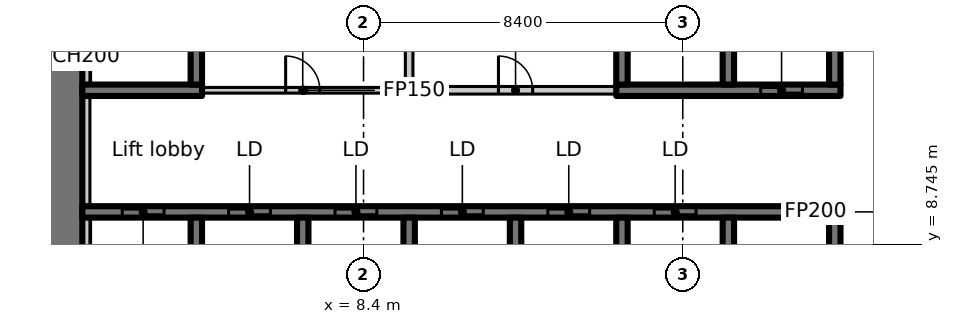
"""IFC4 building model, lengths in metres.
Left out: names, types, materials, properties, quantities, classifications, styles, units other than length and angle.
Written with IfcOpenShell. Run it as: python <this file> out.ifc"""

import sys

from ifc_helpers import new_model, si_unit, direction, frame, frame_2d, origin, place, context, subcontext, project, spatial, rectangle, extrude, element, fill, save


model = new_model("IFC4")
c1 = context("Model", 3, precision=1e-05, world=origin(), true_north=direction((0.0, 1.0)))
c2 = subcontext(c1, "Body", "Model", "MODEL_VIEW")
j1 = project(units=[si_unit("LENGTHUNIT", "METRE"), si_unit("PLANEANGLEUNIT", "RADIAN")], contexts=[c1])
p1 = place(None, origin())
s1 = spatial("IfcSite", under=j1, at=p1, CompositionType="ELEMENT")
p2 = place(p1, origin())
s2 = spatial("IfcBuilding", under=s1, at=p2, CompositionType="ELEMENT")
p3 = place(p2, frame((0.0, 0.0, 58.1)))
s3 = spatial("IfcBuildingStorey", under=s2, at=p3, CompositionType="ELEMENT", Elevation=58.1)
p4 = place(p3, frame((0.5, 6.936, 0.0), z_axis=(0.0, 0.0, 1.0), x_axis=(0.0, 1.0, 0.0)))
e1 = element("IfcWall", 1, at=p4, inside=s3, PredefinedType="SHEAR", context=c2, shape_type="SweptSolid", body=[
    extrude(rectangle(XDim=8.864, YDim=1.0, at=frame_2d((4.432, 0.0))), origin(), (0.0, 0.0, 1.0), 3.35),
])
p5 = place(p3, frame((1.0, 9.6, 0.0), z_axis=(0.0, 0.0, 1.0), x_axis=(1.0, 0.0, 0.0)))
e2 = element("IfcWall", 2, at=p5, inside=s3, PredefinedType="SHEAR", context=c2, shape_type="SweptSolid", body=[
    extrude(rectangle(XDim=19.95, YDim=0.3, at=frame_2d((9.975, 0.0))), origin(), (0.0, 0.0, 1.0), 3.35),
])
p6 = place(p5, frame((1.05, 0.0, 0.0)))
e3 = element("IfcOpeningElement", 3, at=p6, cuts=e2, PredefinedType="OPENING", context=c2, shape_type="SweptSolid", body=[
    extrude(rectangle(XDim=1.1, YDim=2.3, at=frame_2d((0.55, 1.15))), frame((0.0, 0.16, 0.0), z_axis=(0.0, -1.0, 0.0), x_axis=(1.0, 0.0, 0.0)), (0.0, 0.0, 1.0), 0.32),
])
p7 = place(p5, frame((3.85, 0.0, 0.0)))
e4 = element("IfcOpeningElement", 4, at=p7, cuts=e2, PredefinedType="OPENING", context=c2, shape_type="SweptSolid", body=[
    extrude(rectangle(XDim=1.1, YDim=2.3, at=frame_2d((0.55, 1.15))), frame((0.0, 0.16, 0.0), z_axis=(0.0, -1.0, 0.0), x_axis=(1.0, 0.0, 0.0)), (0.0, 0.0, 1.0), 0.32),
])
p8 = place(p5, frame((6.65, 0.0, 0.0)))
e5 = element("IfcOpeningElement", 5, at=p8, cuts=e2, PredefinedType="OPENING", context=c2, shape_type="SweptSolid", body=[
    extrude(rectangle(XDim=1.1, YDim=2.3, at=frame_2d((0.55, 1.15))), frame((0.0, 0.16, 0.0), z_axis=(0.0, -1.0, 0.0), x_axis=(1.0, 0.0, 0.0)), (0.0, 0.0, 1.0), 0.32),
])
p9 = place(p5, frame((9.45, 0.0, 0.0)))
e6 = element("IfcOpeningElement", 6, at=p9, cuts=e2, PredefinedType="OPENING", context=c2, shape_type="SweptSolid", body=[
    extrude(rectangle(XDim=1.1, YDim=2.3, at=frame_2d((0.55, 1.15))), frame((0.0, 0.16, 0.0), z_axis=(0.0, -1.0, 0.0), x_axis=(1.0, 0.0, 0.0)), (0.0, 0.0, 1.0), 0.32),
])
p10 = place(p5, frame((12.25, 0.0, 0.0)))
e7 = element("IfcOpeningElement", 7, at=p10, cuts=e2, PredefinedType="OPENING", context=c2, shape_type="SweptSolid", body=[
    extrude(rectangle(XDim=1.1, YDim=2.3, at=frame_2d((0.55, 1.15))), frame((0.0, 0.16, 0.0), z_axis=(0.0, -1.0, 0.0), x_axis=(1.0, 0.0, 0.0)), (0.0, 0.0, 1.0), 0.32),
])
p11 = place(p5, frame((15.05, 0.0, 0.0)))
e8 = element("IfcOpeningElement", 8, at=p11, cuts=e2, PredefinedType="OPENING", context=c2, shape_type="SweptSolid", body=[
    extrude(rectangle(XDim=1.1, YDim=2.3, at=frame_2d((0.55, 1.15))), frame((0.0, 0.16, 0.0), z_axis=(0.0, -1.0, 0.0), x_axis=(1.0, 0.0, 0.0)), (0.0, 0.0, 1.0), 0.32),
])
for number, where, z_axis, x_axis in (
    (9, (4.0, 7.15, 0.0), (0.0, 0.0, 1.0), (0.0, 1.0, 0.0)),
    (10, (6.8, 7.15, 0.0), (0.0, 0.0, 1.0), (0.0, 1.0, 0.0)),
    (11, (9.6, 7.15, 0.0), (0.0, 0.0, 1.0), (0.0, 1.0, 0.0)),
    (12, (12.4, 7.15, 0.0), (0.0, 0.0, 1.0), (0.0, 1.0, 0.0)),
    (13, (15.2, 7.15, 0.0), (0.0, 0.0, 1.0), (0.0, 1.0, 0.0)),
    (14, (18.0, 7.15, 0.0), (0.0, 0.0, 1.0), (0.0, 1.0, 0.0)),
    (15, (20.8, 7.15, 0.0), (0.0, 0.0, 1.0), (0.0, 1.0, 0.0)),
):
    element("IfcWall", number, at=place(p3, frame(where, z_axis=z_axis, x_axis=x_axis)), inside=s3, PredefinedType="SHEAR", context=c2, shape_type="SweptSolid", body=[
        extrude(rectangle(XDim=2.3, YDim=0.3, at=frame_2d((1.15, 0.0))), origin(), (0.0, 0.0, 1.0), 3.35),
    ])
p12 = place(p3, frame((1.0, 12.8, 0.0), z_axis=(0.0, 0.0, 1.0), x_axis=(1.0, 0.0, 0.0)))
e16 = element("IfcWall", 16, at=p12, inside=s3, PredefinedType="SHEAR", context=c2, shape_type="SweptSolid", body=[
    extrude(rectangle(XDim=3.15, YDim=0.3, at=frame_2d((1.575, 0.0))), origin(), (0.0, 0.0, 1.0), 3.35),
])
p13 = place(p3, frame((4.0, 12.95, 0.0), z_axis=(0.0, 0.0, 1.0), x_axis=(0.0, 1.0, 0.0)))
e17 = element("IfcWall", 17, at=p13, inside=s3, PredefinedType="SHEAR", context=c2, shape_type="SweptSolid", body=[
    extrude(rectangle(XDim=2.85, YDim=0.3, at=frame_2d((1.425, 0.0))), origin(), (0.0, 0.0, 1.0), 3.35),
])
p14 = place(p3, frame((15.05, 12.8, 0.0), z_axis=(0.0, 0.0, 1.0), x_axis=(1.0, 0.0, 0.0)))
e18 = element("IfcWall", 18, at=p14, inside=s3, PredefinedType="SHEAR", context=c2, shape_type="SweptSolid", body=[
    extrude(rectangle(XDim=5.9, YDim=0.3, at=frame_2d((2.95, 0.0))), origin(), (0.0, 0.0, 1.0), 3.35),
])
p15 = place(p14, frame((3.8, 0.0, 0.0)))
e19 = element("IfcOpeningElement", 19, at=p15, cuts=e18, PredefinedType="OPENING", context=c2, shape_type="SweptSolid", body=[
    extrude(rectangle(XDim=1.1, YDim=2.3, at=frame_2d((0.55, 1.15))), frame((0.0, 0.16, 0.0), z_axis=(0.0, -1.0, 0.0), x_axis=(1.0, 0.0, 0.0)), (0.0, 0.0, 1.0), 0.32),
])
for number, where, z_axis, x_axis in (
    (20, (15.2, 12.95, 0.0), (0.0, 0.0, 1.0), (0.0, 1.0, 0.0)),
    (21, (18.0, 12.95, 0.0), (0.0, 0.0, 1.0), (0.0, 1.0, 0.0)),
    (22, (20.8, 12.95, 0.0), (0.0, 0.0, 1.0), (0.0, 1.0, 0.0)),
):
    element("IfcWall", number, at=place(p3, frame(where, z_axis=z_axis, x_axis=x_axis)), inside=s3, PredefinedType="SHEAR", context=c2, shape_type="SweptSolid", body=[
        extrude(rectangle(XDim=2.85, YDim=0.3, at=frame_2d((1.425, 0.0))), origin(), (0.0, 0.0, 1.0), 3.35),
    ])
p16 = place(p3, frame((9.6, 15.588, 0.0), z_axis=(0.0, 0.0, 1.0), x_axis=(0.0, -1.0, 0.0)))
e23 = element("IfcWall", 23, at=p16, inside=s3, PredefinedType="PARTITIONING", context=c2, shape_type="SweptSolid", body=[
    extrude(rectangle(XDim=2.788, YDim=0.2, at=frame_2d((1.394, 0.0))), origin(), (0.0, 0.0, 1.0), 3.35),
])
p17 = place(p3, frame((9.7, 12.8, 0.0), z_axis=(0.0, 0.0, 1.0), x_axis=(1.0, 0.0, 0.0)))
e24 = element("IfcWall", 24, at=p17, inside=s3, PredefinedType="PARTITIONING", context=c2, shape_type="SweptSolid", body=[
    extrude(rectangle(XDim=5.338, YDim=0.2, at=frame_2d((2.669, 0.0))), origin(), (0.0, 0.0, 1.0), 3.35),
])
p18 = place(p17, frame((2.25, 0.0, 0.0)))
e25 = element("IfcOpeningElement", 25, at=p18, cuts=e24, PredefinedType="OPENING", context=c2, shape_type="SweptSolid", body=[
    extrude(rectangle(XDim=0.9, YDim=2.1, at=frame_2d((0.45, 1.05))), frame((0.0, 0.11, 0.0), z_axis=(0.0, -1.0, 0.0), x_axis=(1.0, 0.0, 0.0)), (0.0, 0.0, 1.0), 0.22),
])
p19 = place(p3, frame((4.162, 12.8, 0.0), z_axis=(0.0, 0.0, 1.0), x_axis=(1.0, 0.0, 0.0)))
e26 = element("IfcWall", 26, at=p19, inside=s3, PredefinedType="PARTITIONING", context=c2, shape_type="SweptSolid", body=[
    extrude(rectangle(XDim=5.338, YDim=0.15, at=frame_2d((2.669, 0.0))), origin(), (0.0, 0.0, 1.0), 3.35),
])
p20 = place(p19, frame((2.188, 0.0, 0.0)))
e27 = element("IfcOpeningElement", 27, at=p20, cuts=e26, PredefinedType="OPENING", context=c2, shape_type="SweptSolid", body=[
    extrude(rectangle(XDim=0.9, YDim=2.1, at=frame_2d((0.45, 1.05))), frame((0.0, 0.085, 0.0), z_axis=(0.0, -1.0, 0.0), x_axis=(1.0, 0.0, 0.0)), (0.0, 0.0, 1.0), 0.17),
])
p21 = place(p3, frame((1.1, 7.15, 0.0), z_axis=(0.0, 0.0, 1.0), x_axis=(0.0, 1.0, 0.0)))
e28 = element("IfcWall", 28, at=p21, inside=s3, PredefinedType="PARTITIONING", context=c2, shape_type="SweptSolid", body=[
    extrude(rectangle(XDim=2.3, YDim=0.2, at=frame_2d((1.15, 0.0))), origin(), (0.0, 0.0, 1.0), 3.35),
])
p22 = place(p3, frame((1.1, 9.75, 0.0), z_axis=(0.0, 0.0, 1.0), x_axis=(0.0, 1.0, 0.0)))
e29 = element("IfcWall", 29, at=p22, inside=s3, PredefinedType="PARTITIONING", context=c2, shape_type="SweptSolid", body=[
    extrude(rectangle(XDim=2.9, YDim=0.2, at=frame_2d((1.45, 0.0))), origin(), (0.0, 0.0, 1.0), 3.35),
])
p23 = place(p3, frame((1.1, 12.95, 0.0), z_axis=(0.0, 0.0, 1.0), x_axis=(0.0, 1.0, 0.0)))
e30 = element("IfcWall", 30, at=p23, inside=s3, PredefinedType="PARTITIONING", context=c2, shape_type="SweptSolid", body=[
    extrude(rectangle(XDim=2.65, YDim=0.2, at=frame_2d((1.325, 0.0))), origin(), (0.0, 0.0, 1.0), 3.35),
])
p24 = place(p6, origin())
e31 = element("IfcDoor", 31, at=p24, inside=s3, OperationType="SLIDING_TO_LEFT", PredefinedType="DOOR", context=c2, shape_type="SweptSolid", body=[
    extrude(rectangle(XDim=1.1, YDim=2.3, at=frame_2d((0.55, 1.15))), frame((0.0, 0.025, 0.0), z_axis=(0.0, -1.0, 0.0), x_axis=(1.0, 0.0, 0.0)), (0.0, 0.0, 1.0), 0.05),
])
fill(e3, e31)
p25 = place(p7, origin())
e32 = element("IfcDoor", 32, at=p25, inside=s3, OperationType="SLIDING_TO_LEFT", PredefinedType="DOOR", context=c2, shape_type="SweptSolid", body=[
    extrude(rectangle(XDim=1.1, YDim=2.3, at=frame_2d((0.55, 1.15))), frame((0.0, 0.025, 0.0), z_axis=(0.0, -1.0, 0.0), x_axis=(1.0, 0.0, 0.0)), (0.0, 0.0, 1.0), 0.05),
])
fill(e4, e32)
p26 = place(p8, origin())
e33 = element("IfcDoor", 33, at=p26, inside=s3, OperationType="SLIDING_TO_LEFT", PredefinedType="DOOR", context=c2, shape_type="SweptSolid", body=[
    extrude(rectangle(XDim=1.1, YDim=2.3, at=frame_2d((0.55, 1.15))), frame((0.0, 0.025, 0.0), z_axis=(0.0, -1.0, 0.0), x_axis=(1.0, 0.0, 0.0)), (0.0, 0.0, 1.0), 0.05),
])
fill(e5, e33)
p27 = place(p9, origin())
e34 = element("IfcDoor", 34, at=p27, inside=s3, OperationType="SLIDING_TO_LEFT", PredefinedType="DOOR", context=c2, shape_type="SweptSolid", body=[
    extrude(rectangle(XDim=1.1, YDim=2.3, at=frame_2d((0.55, 1.15))), frame((0.0, 0.025, 0.0), z_axis=(0.0, -1.0, 0.0), x_axis=(1.0, 0.0, 0.0)), (0.0, 0.0, 1.0), 0.05),
])
fill(e6, e34)
p28 = place(p10, origin())
e35 = element("IfcDoor", 35, at=p28, inside=s3, OperationType="SLIDING_TO_LEFT", PredefinedType="DOOR", context=c2, shape_type="SweptSolid", body=[
    extrude(rectangle(XDim=1.1, YDim=2.3, at=frame_2d((0.55, 1.15))), frame((0.0, 0.025, 0.0), z_axis=(0.0, -1.0, 0.0), x_axis=(1.0, 0.0, 0.0)), (0.0, 0.0, 1.0), 0.05),
])
fill(e7, e35)
p29 = place(p11, origin())
e36 = element("IfcDoor", 36, at=p29, inside=s3, OperationType="SLIDING_TO_LEFT", PredefinedType="DOOR", context=c2, shape_type="SweptSolid", body=[
    extrude(rectangle(XDim=1.1, YDim=2.3, at=frame_2d((0.55, 1.15))), frame((0.0, 0.025, 0.0), z_axis=(0.0, -1.0, 0.0), x_axis=(1.0, 0.0, 0.0)), (0.0, 0.0, 1.0), 0.05),
])
fill(e8, e36)
p30 = place(p15, origin())
e37 = element("IfcDoor", 37, at=p30, inside=s3, OperationType="SLIDING_TO_LEFT", PredefinedType="DOOR", context=c2, shape_type="SweptSolid", body=[
    extrude(rectangle(XDim=1.1, YDim=2.3, at=frame_2d((0.55, 1.15))), frame((0.0, 0.025, 0.0), z_axis=(0.0, -1.0, 0.0), x_axis=(1.0, 0.0, 0.0)), (0.0, 0.0, 1.0), 0.05),
])
fill(e19, e37)
p31 = place(p20, origin())
e38 = element("IfcDoor", 38, at=p31, inside=s3, OperationType="SINGLE_SWING_RIGHT", PredefinedType="DOOR", context=c2, shape_type="SweptSolid", body=[
    extrude(rectangle(XDim=0.9, YDim=2.1, at=frame_2d((0.45, 1.05))), frame((0.0, 0.025, 0.0), z_axis=(0.0, -1.0, 0.0), x_axis=(1.0, 0.0, 0.0)), (0.0, 0.0, 1.0), 0.05),
])
fill(e27, e38)
p32 = place(p18, origin())
e39 = element("IfcDoor", 39, at=p32, inside=s3, OperationType="SINGLE_SWING_LEFT", PredefinedType="DOOR", context=c2, shape_type="SweptSolid", body=[
    extrude(rectangle(XDim=0.9, YDim=2.1, at=frame_2d((0.45, 1.05))), frame((0.0, 0.025, 0.0), z_axis=(0.0, -1.0, 0.0), x_axis=(1.0, 0.0, 0.0)), (0.0, 0.0, 1.0), 0.05),
])
fill(e25, e39)
save(model, sys.argv[1])
